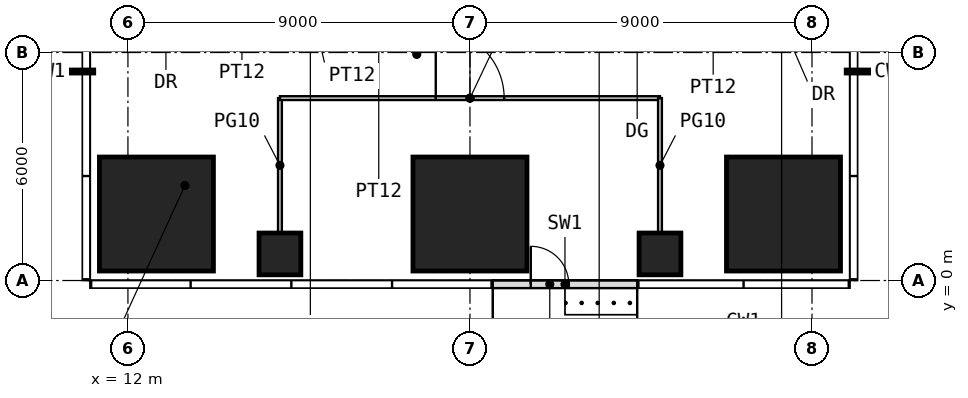
"""IFC4 building model, lengths in metres.
Left out: names, types, materials, properties, quantities, classifications, styles, units other than length and angle.
Written with IfcOpenShell. Run it as: python <this file> out.ifc"""

import sys

from ifc_helpers import new_model, si_unit, direction, frame, frame_2d, origin, origin_2d, place, context, subcontext, project, spatial, rectangle, extrude, element, fill, save


model = new_model("IFC4")
c1 = context("Model", 3, precision=1e-05, world=origin(), true_north=direction((0.0, 1.0)))
c2 = subcontext(c1, "Body", "Model", "MODEL_VIEW")
j1 = project(units=[si_unit("LENGTHUNIT", "METRE"), si_unit("PLANEANGLEUNIT", "RADIAN")], contexts=[c1])
p1 = place(None, origin())
s1 = spatial("IfcSite", under=j1, at=p1, CompositionType="ELEMENT")
p2 = place(p1, origin())
s2 = spatial("IfcBuilding", under=s1, at=p2, CompositionType="ELEMENT")
p3 = place(p2, frame((0.0, 0.0, 144.5)))
s3 = spatial("IfcBuildingStorey", under=s2, at=p3, CompositionType="ELEMENT", Elevation=144.5)
p4 = place(p3, frame((12.75, 1.75, 0.0), z_axis=(0.0, 0.0, 1.0), x_axis=(1.0, 0.0, 0.0)))
e1 = element("IfcColumn", 1, at=p4, inside=s3, PredefinedType="COLUMN", context=c2, shape_type="SweptSolid", body=[
    extrude(rectangle(XDim=3.0, YDim=3.0, at=origin_2d()), origin(), (0.0, 0.0, 1.0), 4.0),
])
p5 = place(p3, frame((16.0, 0.7, 0.0), z_axis=(0.0, 0.0, 1.0), x_axis=(1.0, 0.0, 0.0)))
e2 = element("IfcColumn", 2, at=p5, inside=s3, PredefinedType="COLUMN", context=c2, shape_type="SweptSolid", body=[
    extrude(rectangle(XDim=1.1, YDim=1.1, at=origin_2d()), origin(), (0.0, 0.0, 1.0), 4.0),
])
p6 = place(p3, frame((21.0, 1.75, 0.0), z_axis=(0.0, 0.0, 1.0), x_axis=(1.0, 0.0, 0.0)))
e3 = element("IfcColumn", 3, at=p6, inside=s3, PredefinedType="COLUMN", context=c2, shape_type="SweptSolid", body=[
    extrude(rectangle(XDim=3.0, YDim=3.0, at=origin_2d()), origin(), (0.0, 0.0, 1.0), 4.0),
])
p7 = place(p3, frame((26.0, 0.7, 0.0), z_axis=(0.0, 0.0, 1.0), x_axis=(1.0, 0.0, 0.0)))
e4 = element("IfcColumn", 4, at=p7, inside=s3, PredefinedType="COLUMN", context=c2, shape_type="SweptSolid", body=[
    extrude(rectangle(XDim=1.1, YDim=1.1, at=origin_2d()), origin(), (0.0, 0.0, 1.0), 4.0),
])
p8 = place(p3, frame((29.25, 1.75, 0.0), z_axis=(0.0, 0.0, 1.0), x_axis=(1.0, 0.0, 0.0)))
e5 = element("IfcColumn", 5, at=p8, inside=s3, PredefinedType="COLUMN", context=c2, shape_type="SweptSolid", body=[
    extrude(rectangle(XDim=3.0, YDim=3.0, at=origin_2d()), origin(), (0.0, 0.0, 1.0), 4.0),
])
p9 = place(p3, frame((21.6, -0.1, 0.0), z_axis=(0.0, 0.0, 1.0), x_axis=(1.0, 0.0, 0.0)))
e6 = element("IfcWall", 6, at=p9, inside=s3, PredefinedType="USERDEFINED", context=c2, shape_type="SweptSolid", body=[
    extrude(rectangle(XDim=3.8, YDim=0.2, at=frame_2d((1.9, 0.0))), origin(), (0.0, 0.0, 1.0), 3.75),
])
p10 = place(p9, frame((1.0, 0.0, 0.0)))
e7 = element("IfcOpeningElement", 7, at=p10, cuts=e6, PredefinedType="OPENING", context=c2, shape_type="SweptSolid", body=[
    extrude(rectangle(XDim=1.0, YDim=2.4, at=frame_2d((0.5, 1.2))), frame((0.0, 0.11, 0.0), z_axis=(0.0, -1.0, 0.0), x_axis=(1.0, 0.0, 0.0)), (0.0, 0.0, 1.0), 0.22),
])
p11 = place(p3, frame((16.0, 1.26, 0.0), z_axis=(0.0, 0.0, 1.0), x_axis=(0.0, 1.0, 0.0)))
e8 = element("IfcWall", 8, at=p11, inside=s3, PredefinedType="PARTITIONING", context=c2, shape_type="SweptSolid", body=[
    extrude(rectangle(XDim=3.54, YDim=0.1, at=frame_2d((1.77, 0.0))), origin(), (0.0, 0.0, 1.0), 3.75),
])
p12 = place(p3, frame((16.0, 4.8, 0.0), z_axis=(0.0, 0.0, 1.0), x_axis=(1.0, 0.0, 0.0)))
e9 = element("IfcWall", 9, at=p12, inside=s3, PredefinedType="PARTITIONING", context=c2, shape_type="SweptSolid", body=[
    extrude(rectangle(XDim=10.0, YDim=0.1, at=frame_2d((5.0, 0.0))), origin(), (0.0, 0.0, 1.0), 3.75),
])
p13 = place(p12, frame((4.1, 0.0, 0.0)))
e10 = element("IfcOpeningElement", 10, at=p13, cuts=e9, PredefinedType="OPENING", context=c2, shape_type="SweptSolid", body=[
    extrude(rectangle(XDim=1.8, YDim=2.4, at=frame_2d((0.9, 1.2))), frame((0.0, 0.06, 0.0), z_axis=(0.0, -1.0, 0.0), x_axis=(1.0, 0.0, 0.0)), (0.0, 0.0, 1.0), 0.12),
])
p14 = place(p3, frame((26.0, 1.26, 0.0), z_axis=(0.0, 0.0, 1.0), x_axis=(0.0, 1.0, 0.0)))
e11 = element("IfcWall", 11, at=p14, inside=s3, PredefinedType="PARTITIONING", context=c2, shape_type="SweptSolid", body=[
    extrude(rectangle(XDim=3.54, YDim=0.1, at=frame_2d((1.77, 0.0))), origin(), (0.0, 0.0, 1.0), 3.75),
])
p15 = place(p10, origin())
e12 = element("IfcDoor", 12, at=p15, inside=s3, OperationType="SINGLE_SWING_LEFT", PredefinedType="DOOR", context=c2, shape_type="SweptSolid", body=[
    extrude(rectangle(XDim=1.0, YDim=2.4, at=frame_2d((0.5, 1.2))), frame((0.0, 0.025, 0.0), z_axis=(0.0, -1.0, 0.0), x_axis=(1.0, 0.0, 0.0)), (0.0, 0.0, 1.0), 0.05),
])
fill(e7, e12)
p16 = place(p13, origin())
e13 = element("IfcDoor", 13, at=p16, inside=s3, OperationType="DOUBLE_DOOR_SINGLE_SWING", PredefinedType="DOOR", context=c2, shape_type="SweptSolid", body=[
    extrude(rectangle(XDim=1.8, YDim=2.4, at=frame_2d((0.9, 1.2))), frame((0.0, 0.025, 0.0), z_axis=(0.0, -1.0, 0.0), x_axis=(1.0, 0.0, 0.0)), (0.0, 0.0, 1.0), 0.05),
])
fill(e10, e13)
save(model, sys.argv[1])
